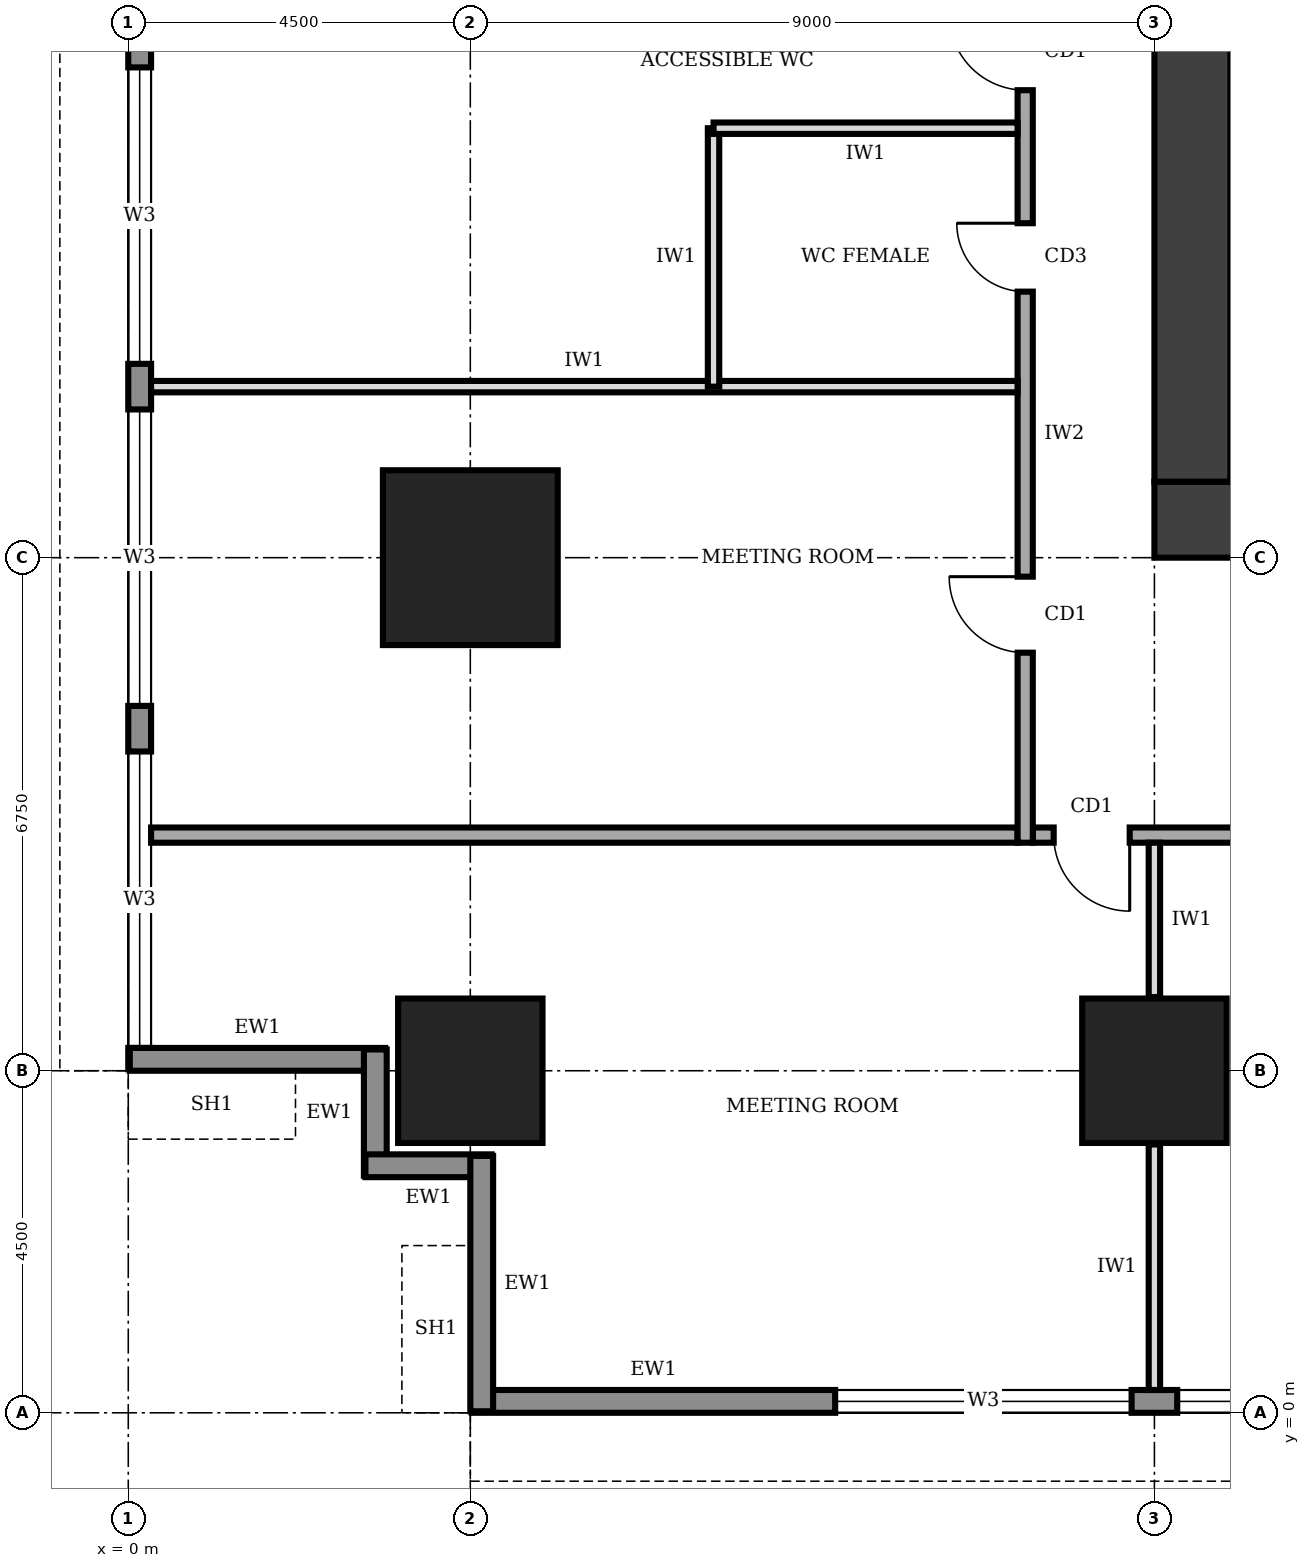
"""IFC4 building model, lengths in metres.
Left out: names, types, materials, properties, quantities, classifications, styles, units other than length and angle.
Written with IfcOpenShell. Run it as: python <this file> out.ifc"""

import sys

from ifc_helpers import new_model, si_unit, direction, frame, frame_2d, origin, origin_2d, place, context, subcontext, project, spatial, rectangle, extrude, element, fill, save


model = new_model("IFC4")
c1 = context("Model", 3, precision=1e-05, world=origin(), true_north=direction((0.0, 1.0)))
c2 = subcontext(c1, "Body", "Model", "MODEL_VIEW")
j1 = project(units=[si_unit("LENGTHUNIT", "METRE"), si_unit("PLANEANGLEUNIT", "RADIAN")], contexts=[c1])
p1 = place(None, origin())
s1 = spatial("IfcSite", under=j1, at=p1, CompositionType="ELEMENT")
p2 = place(p1, origin())
s2 = spatial("IfcBuilding", under=s1, at=p2, CompositionType="ELEMENT")
p3 = place(p2, frame((0.0, 0.0, 85.0)))
s3 = spatial("IfcBuildingStorey", under=s2, at=p3, CompositionType="ELEMENT", Elevation=85.0)
p4 = place(p3, frame((13.5, 11.75, 0.0), z_axis=(0.0, 0.0, 1.0), x_axis=(1.0, 0.0, 0.0)))
e1 = element("IfcWall", 1, at=p4, inside=s3, PredefinedType="SHEAR", context=c2, shape_type="SweptSolid", body=[
    extrude(rectangle(XDim=13.5, YDim=1.0, at=frame_2d((6.75, 0.0))), origin(), (0.0, 0.0, 1.0), 4.0),
])
p5 = place(p4, frame((4.75, 0.0, 0.0)))
e2 = element("IfcOpeningElement", 2, at=p5, cuts=e1, PredefinedType="OPENING", context=c2, shape_type="SweptSolid", body=[
    extrude(rectangle(XDim=1.0, YDim=2.1, at=frame_2d((0.5, 1.05))), frame((0.0, 0.51, 0.0), z_axis=(0.0, -1.0, 0.0), x_axis=(1.0, 0.0, 0.0)), (0.0, 0.0, 1.0), 1.02),
])
p6 = place(p3, frame((14.0, 28.25, 0.0), z_axis=(0.0, 0.0, 1.0), x_axis=(0.0, -1.0, 0.0)))
e3 = element("IfcWall", 3, at=p6, inside=s3, PredefinedType="SHEAR", context=c2, shape_type="SweptSolid", body=[
    extrude(rectangle(XDim=16.0, YDim=1.0, at=frame_2d((8.0, 0.0))), origin(), (0.0, 0.0, 1.0), 4.0),
])
for number, where, z_axis, x_axis in (
    (4, (4.5, 4.5, 0.0), (0.0, 0.0, 1.0), (1.0, 0.0, 0.0)),
    (5, (13.5, 4.5, 0.0), (0.0, 0.0, 1.0), (1.0, 0.0, 0.0)),
):
    element("IfcColumn", number, at=place(p3, frame(where, z_axis=z_axis, x_axis=x_axis)), inside=s3, PredefinedType="COLUMN", context=c2, shape_type="SweptSolid", body=[
        extrude(rectangle(XDim=1.9, YDim=1.9, at=origin_2d()), origin(), (0.0, 0.0, 1.0), 4.0),
    ])
p7 = place(p3, frame((4.5, 11.25, 0.0), z_axis=(0.0, 0.0, 1.0), x_axis=(1.0, 0.0, 0.0)))
e6 = element("IfcColumn", 6, at=p7, inside=s3, PredefinedType="COLUMN", context=c2, shape_type="SweptSolid", body=[
    extrude(rectangle(XDim=2.3, YDim=2.3, at=origin_2d()), origin(), (0.0, 0.0, 1.0), 4.0),
])
p8 = place(p3, frame((4.52, 0.15, 0.0), z_axis=(0.0, 0.0, 1.0), x_axis=(1.0, 0.0, 0.0)))
e7 = element("IfcWall", 7, at=p8, inside=s3, PredefinedType="STANDARD", context=c2, shape_type="SweptSolid", body=[
    extrude(rectangle(XDim=31.46, YDim=0.3, at=frame_2d((15.73, 0.0))), origin(), (0.0, 0.0, 1.0), 3.75),
])
p9 = place(p8, frame((4.78, 0.0, 0.95)))
e8 = element("IfcOpeningElement", 8, at=p9, cuts=e7, PredefinedType="OPENING", context=c2, shape_type="SweptSolid", body=[
    extrude(rectangle(XDim=3.9, YDim=1.8, at=frame_2d((1.95, 0.9))), frame((0.0, 0.16, 0.0), z_axis=(0.0, -1.0, 0.0), x_axis=(1.0, 0.0, 0.0)), (0.0, 0.0, 1.0), 0.32),
])
p10 = place(p8, frame((9.28, 0.0, 0.95)))
e9 = element("IfcOpeningElement", 9, at=p10, cuts=e7, PredefinedType="OPENING", context=c2, shape_type="SweptSolid", body=[
    extrude(rectangle(XDim=3.9, YDim=1.8, at=frame_2d((1.95, 0.9))), frame((0.0, 0.16, 0.0), z_axis=(0.0, -1.0, 0.0), x_axis=(1.0, 0.0, 0.0)), (0.0, 0.0, 1.0), 0.32),
])
p11 = place(p8, frame((13.78, 0.0, 0.95)))
e10 = element("IfcOpeningElement", 10, at=p11, cuts=e7, PredefinedType="OPENING", context=c2, shape_type="SweptSolid", body=[
    extrude(rectangle(XDim=3.9, YDim=1.8, at=frame_2d((1.95, 0.9))), frame((0.0, 0.16, 0.0), z_axis=(0.0, -1.0, 0.0), x_axis=(1.0, 0.0, 0.0)), (0.0, 0.0, 1.0), 0.32),
])
p12 = place(p8, frame((18.28, 0.0, 0.95)))
e11 = element("IfcOpeningElement", 11, at=p12, cuts=e7, PredefinedType="OPENING", context=c2, shape_type="SweptSolid", body=[
    extrude(rectangle(XDim=3.9, YDim=1.8, at=frame_2d((1.95, 0.9))), frame((0.0, 0.16, 0.0), z_axis=(0.0, -1.0, 0.0), x_axis=(1.0, 0.0, 0.0)), (0.0, 0.0, 1.0), 0.32),
])
p13 = place(p8, frame((22.78, 0.0, 0.95)))
e12 = element("IfcOpeningElement", 12, at=p13, cuts=e7, PredefinedType="OPENING", context=c2, shape_type="SweptSolid", body=[
    extrude(rectangle(XDim=3.9, YDim=1.8, at=frame_2d((1.95, 0.9))), frame((0.0, 0.16, 0.0), z_axis=(0.0, -1.0, 0.0), x_axis=(1.0, 0.0, 0.0)), (0.0, 0.0, 1.0), 0.32),
])
p14 = place(p8, frame((27.28, 0.0, 0.95)))
e13 = element("IfcOpeningElement", 13, at=p14, cuts=e7, PredefinedType="OPENING", context=c2, shape_type="SweptSolid", body=[
    extrude(rectangle(XDim=3.9, YDim=1.8, at=frame_2d((1.95, 0.9))), frame((0.0, 0.16, 0.0), z_axis=(0.0, -1.0, 0.0), x_axis=(1.0, 0.0, 0.0)), (0.0, 0.0, 1.0), 0.32),
])
p15 = place(p3, frame((0.15, 35.98, 0.0), z_axis=(0.0, 0.0, 1.0), x_axis=(0.0, -1.0, 0.0)))
e14 = element("IfcWall", 14, at=p15, inside=s3, PredefinedType="STANDARD", context=c2, shape_type="SweptSolid", body=[
    extrude(rectangle(XDim=31.46, YDim=0.3, at=frame_2d((15.73, 0.0))), origin(), (0.0, 0.0, 1.0), 3.75),
])
p16 = place(p15, frame((27.28, 0.0, 0.95)))
e15 = element("IfcOpeningElement", 15, at=p16, cuts=e14, PredefinedType="OPENING", context=c2, shape_type="SweptSolid", body=[
    extrude(rectangle(XDim=3.9, YDim=1.8, at=frame_2d((1.95, 0.9))), frame((0.0, 0.16, 0.0), z_axis=(0.0, -1.0, 0.0), x_axis=(1.0, 0.0, 0.0)), (0.0, 0.0, 1.0), 0.32),
])
p17 = place(p15, frame((22.78, 0.0, 0.95)))
e16 = element("IfcOpeningElement", 16, at=p17, cuts=e14, PredefinedType="OPENING", context=c2, shape_type="SweptSolid", body=[
    extrude(rectangle(XDim=3.9, YDim=1.8, at=frame_2d((1.95, 0.9))), frame((0.0, 0.16, 0.0), z_axis=(0.0, -1.0, 0.0), x_axis=(1.0, 0.0, 0.0)), (0.0, 0.0, 1.0), 0.32),
])
p18 = place(p15, frame((18.28, 0.0, 0.95)))
e17 = element("IfcOpeningElement", 17, at=p18, cuts=e14, PredefinedType="OPENING", context=c2, shape_type="SweptSolid", body=[
    extrude(rectangle(XDim=3.9, YDim=1.8, at=frame_2d((1.95, 0.9))), frame((0.0, 0.16, 0.0), z_axis=(0.0, -1.0, 0.0), x_axis=(1.0, 0.0, 0.0)), (0.0, 0.0, 1.0), 0.32),
])
p19 = place(p15, frame((13.78, 0.0, 0.95)))
e18 = element("IfcOpeningElement", 18, at=p19, cuts=e14, PredefinedType="OPENING", context=c2, shape_type="SweptSolid", body=[
    extrude(rectangle(XDim=3.9, YDim=1.8, at=frame_2d((1.95, 0.9))), frame((0.0, 0.16, 0.0), z_axis=(0.0, -1.0, 0.0), x_axis=(1.0, 0.0, 0.0)), (0.0, 0.0, 1.0), 0.32),
])
p20 = place(p15, frame((9.28, 0.0, 0.95)))
e19 = element("IfcOpeningElement", 19, at=p20, cuts=e14, PredefinedType="OPENING", context=c2, shape_type="SweptSolid", body=[
    extrude(rectangle(XDim=3.9, YDim=1.8, at=frame_2d((1.95, 0.9))), frame((0.0, 0.16, 0.0), z_axis=(0.0, -1.0, 0.0), x_axis=(1.0, 0.0, 0.0)), (0.0, 0.0, 1.0), 0.32),
])
p21 = place(p15, frame((4.78, 0.0, 0.95)))
e20 = element("IfcOpeningElement", 20, at=p21, cuts=e14, PredefinedType="OPENING", context=c2, shape_type="SweptSolid", body=[
    extrude(rectangle(XDim=3.9, YDim=1.8, at=frame_2d((1.95, 0.9))), frame((0.0, 0.16, 0.0), z_axis=(0.0, -1.0, 0.0), x_axis=(1.0, 0.0, 0.0)), (0.0, 0.0, 1.0), 0.32),
])
p22 = place(p3, frame((0.02, 4.65, 0.0), z_axis=(0.0, 0.0, 1.0), x_axis=(1.0, 0.0, 0.0)))
e21 = element("IfcWall", 21, at=p22, inside=s3, PredefinedType="STANDARD", context=c2, shape_type="SweptSolid", body=[
    extrude(rectangle(XDim=3.36, YDim=0.3, at=frame_2d((1.68, 0.0))), origin(), (0.0, 0.0, 1.0), 2.85),
])
for number, where, z_axis, x_axis in (
    (22, (3.25, 4.78, 0.0), (0.0, 0.0, 1.0), (0.0, -1.0, 0.0)),
    (23, (3.12, 3.25, 0.0), (0.0, 0.0, 1.0), (1.0, 0.0, 0.0)),
):
    element("IfcWall", number, at=place(p3, frame(where, z_axis=z_axis, x_axis=x_axis)), inside=s3, PredefinedType="STANDARD", context=c2, shape_type="SweptSolid", body=[
        extrude(rectangle(XDim=1.66, YDim=0.3, at=frame_2d((0.83, 0.0))), origin(), (0.0, 0.0, 1.0), 3.75),
    ])
p23 = place(p3, frame((4.65, 3.38, 0.0), z_axis=(0.0, 0.0, 1.0), x_axis=(0.0, -1.0, 0.0)))
e24 = element("IfcWall", 24, at=p23, inside=s3, PredefinedType="STANDARD", context=c2, shape_type="SweptSolid", body=[
    extrude(rectangle(XDim=3.36, YDim=0.3, at=frame_2d((1.68, 0.0))), origin(), (0.0, 0.0, 1.0), 2.85),
])
p24 = place(p3, frame((11.9, 7.6, 0.0), z_axis=(0.0, 0.0, 1.0), x_axis=(1.0, 0.0, 0.0)))
e25 = element("IfcWall", 25, at=p24, inside=s3, PredefinedType="SOLIDWALL", context=c2, shape_type="SweptSolid", body=[
    extrude(rectangle(XDim=28.3, YDim=0.2, at=frame_2d((14.15, 0.0))), origin(), (0.0, 0.0, 1.0), 3.75),
])
p25 = place(p24, frame((0.275, 0.0, 0.0)))
e26 = element("IfcOpeningElement", 26, at=p25, cuts=e25, PredefinedType="OPENING", context=c2, shape_type="SweptSolid", body=[
    extrude(rectangle(XDim=1.0, YDim=2.1, at=frame_2d((0.5, 1.05))), frame((0.0, 0.11, 0.0), z_axis=(0.0, -1.0, 0.0), x_axis=(1.0, 0.0, 0.0)), (0.0, 0.0, 1.0), 0.22),
])
p26 = place(p24, frame((7.45, 0.0, 0.0)))
e27 = element("IfcOpeningElement", 27, at=p26, cuts=e25, PredefinedType="OPENING", context=c2, shape_type="SweptSolid", body=[
    extrude(rectangle(XDim=1.8, YDim=2.1, at=frame_2d((0.9, 1.05))), frame((0.0, 0.11, 0.0), z_axis=(0.0, -1.0, 0.0), x_axis=(1.0, 0.0, 0.0)), (0.0, 0.0, 1.0), 0.22),
])
p27 = place(p24, frame((21.3, 0.0, 0.0)))
e28 = element("IfcOpeningElement", 28, at=p27, cuts=e25, PredefinedType="OPENING", context=c2, shape_type="SweptSolid", body=[
    extrude(rectangle(XDim=1.0, YDim=2.1, at=frame_2d((0.5, 1.05))), frame((0.0, 0.11, 0.0), z_axis=(0.0, -1.0, 0.0), x_axis=(1.0, 0.0, 0.0)), (0.0, 0.0, 1.0), 0.22),
])
p28 = place(p3, frame((11.8, 32.8, 0.0), z_axis=(0.0, 0.0, 1.0), x_axis=(0.0, -1.0, 0.0)))
e29 = element("IfcWall", 29, at=p28, inside=s3, PredefinedType="SOLIDWALL", context=c2, shape_type="SweptSolid", body=[
    extrude(rectangle(XDim=25.3, YDim=0.2, at=frame_2d((12.65, 0.0))), origin(), (0.0, 0.0, 1.0), 3.75),
])
p29 = place(p28, frame((21.8, 0.0, 0.0)))
e30 = element("IfcOpeningElement", 30, at=p29, cuts=e29, PredefinedType="OPENING", context=c2, shape_type="SweptSolid", body=[
    extrude(rectangle(XDim=1.0, YDim=2.1, at=frame_2d((0.5, 1.05))), frame((0.0, 0.11, 0.0), z_axis=(0.0, -1.0, 0.0), x_axis=(1.0, 0.0, 0.0)), (0.0, 0.0, 1.0), 0.22),
])
p30 = place(p28, frame((17.15, 0.0, 0.0)))
e31 = element("IfcOpeningElement", 31, at=p30, cuts=e29, PredefinedType="OPENING", context=c2, shape_type="SweptSolid", body=[
    extrude(rectangle(XDim=0.9, YDim=2.1, at=frame_2d((0.45, 1.05))), frame((0.0, 0.11, 0.0), z_axis=(0.0, -1.0, 0.0), x_axis=(1.0, 0.0, 0.0)), (0.0, 0.0, 1.0), 0.22),
])
p31 = place(p28, frame((12.35, 0.0, 0.0)))
e32 = element("IfcOpeningElement", 32, at=p31, cuts=e29, PredefinedType="OPENING", context=c2, shape_type="SweptSolid", body=[
    extrude(rectangle(XDim=0.9, YDim=2.1, at=frame_2d((0.45, 1.05))), frame((0.0, 0.11, 0.0), z_axis=(0.0, -1.0, 0.0), x_axis=(1.0, 0.0, 0.0)), (0.0, 0.0, 1.0), 0.22),
])
p32 = place(p28, frame((9.3, 0.0, 0.0)))
e33 = element("IfcOpeningElement", 33, at=p32, cuts=e29, PredefinedType="OPENING", context=c2, shape_type="SweptSolid", body=[
    extrude(rectangle(XDim=0.9, YDim=2.1, at=frame_2d((0.45, 1.05))), frame((0.0, 0.11, 0.0), z_axis=(0.0, -1.0, 0.0), x_axis=(1.0, 0.0, 0.0)), (0.0, 0.0, 1.0), 0.22),
])
p33 = place(p28, frame((6.3, 0.0, 0.0)))
e34 = element("IfcOpeningElement", 34, at=p33, cuts=e29, PredefinedType="OPENING", context=c2, shape_type="SweptSolid", body=[
    extrude(rectangle(XDim=1.0, YDim=2.1, at=frame_2d((0.5, 1.05))), frame((0.0, 0.11, 0.0), z_axis=(0.0, -1.0, 0.0), x_axis=(1.0, 0.0, 0.0)), (0.0, 0.0, 1.0), 0.22),
])
p34 = place(p28, frame((14.4, 0.0, 0.0)))
e35 = element("IfcOpeningElement", 35, at=p34, cuts=e29, PredefinedType="OPENING", context=c2, shape_type="SweptSolid", body=[
    extrude(rectangle(XDim=1.0, YDim=2.1, at=frame_2d((0.5, 1.05))), frame((0.0, 0.11, 0.0), z_axis=(0.0, -1.0, 0.0), x_axis=(1.0, 0.0, 0.0)), (0.0, 0.0, 1.0), 0.22),
])
p35 = place(p28, frame((2.3, 0.0, 0.0)))
e36 = element("IfcOpeningElement", 36, at=p35, cuts=e29, PredefinedType="OPENING", context=c2, shape_type="SweptSolid", body=[
    extrude(rectangle(XDim=1.0, YDim=2.1, at=frame_2d((0.5, 1.05))), frame((0.0, 0.11, 0.0), z_axis=(0.0, -1.0, 0.0), x_axis=(1.0, 0.0, 0.0)), (0.0, 0.0, 1.0), 0.22),
])
p36 = place(p3, frame((0.3, 7.6, 0.0), z_axis=(0.0, 0.0, 1.0), x_axis=(1.0, 0.0, 0.0)))
e37 = element("IfcWall", 37, at=p36, inside=s3, PredefinedType="SOLIDWALL", context=c2, shape_type="SweptSolid", body=[
    extrude(rectangle(XDim=11.4, YDim=0.2, at=frame_2d((5.7, 0.0))), origin(), (0.0, 0.0, 1.0), 3.75),
])
p37 = place(p3, frame((13.5, 0.3, 0.0), z_axis=(0.0, 0.0, 1.0), x_axis=(0.0, 1.0, 0.0)))
e38 = element("IfcWall", 38, at=p37, inside=s3, PredefinedType="PARTITIONING", context=c2, shape_type="SweptSolid", body=[
    extrude(rectangle(XDim=3.23, YDim=0.15, at=frame_2d((1.615, 0.0))), origin(), (0.0, 0.0, 1.0), 2.85),
])
p38 = place(p3, frame((13.5, 5.47, 0.0), z_axis=(0.0, 0.0, 1.0), x_axis=(0.0, 1.0, 0.0)))
e39 = element("IfcWall", 39, at=p38, inside=s3, PredefinedType="PARTITIONING", context=c2, shape_type="SweptSolid", body=[
    extrude(rectangle(XDim=2.03, YDim=0.15, at=frame_2d((1.015, 0.0))), origin(), (0.0, 0.0, 1.0), 2.85),
])
p39 = place(p3, frame((0.3, 13.5, 0.0), z_axis=(0.0, 0.0, 1.0), x_axis=(1.0, 0.0, 0.0)))
e40 = element("IfcWall", 40, at=p39, inside=s3, PredefinedType="PARTITIONING", context=c2, shape_type="SweptSolid", body=[
    extrude(rectangle(XDim=11.4, YDim=0.15, at=frame_2d((5.7, 0.0))), origin(), (0.0, 0.0, 1.0), 3.75),
])
p40 = place(p3, frame((11.7, 16.9, 0.0), z_axis=(0.0, 0.0, 1.0), x_axis=(-1.0, 0.0, 0.0)))
e41 = element("IfcWall", 41, at=p40, inside=s3, PredefinedType="PARTITIONING", context=c2, shape_type="SweptSolid", body=[
    extrude(rectangle(XDim=4.0, YDim=0.15, at=frame_2d((2.0, 0.0))), origin(), (0.0, 0.0, 1.0), 3.75),
])
p41 = place(p3, frame((7.7, 13.5, 0.0), z_axis=(0.0, 0.0, 1.0), x_axis=(0.0, 1.0, 0.0)))
e42 = element("IfcWall", 42, at=p41, inside=s3, PredefinedType="PARTITIONING", context=c2, shape_type="SweptSolid", body=[
    extrude(rectangle(XDim=3.4, YDim=0.15, at=frame_2d((1.7, 0.0))), origin(), (0.0, 0.0, 1.0), 3.75),
])
p42 = place(p9, origin())
e43 = element("IfcWindow", 43, at=p42, inside=s3, PartitioningType="SINGLE_PANEL", PredefinedType="WINDOW", context=c2, shape_type="SweptSolid", body=[
    extrude(rectangle(XDim=3.9, YDim=1.8, at=frame_2d((1.95, 0.9))), frame((0.0, 0.03, 0.0), z_axis=(0.0, -1.0, 0.0), x_axis=(1.0, 0.0, 0.0)), (0.0, 0.0, 1.0), 0.06),
])
fill(e8, e43)
p43 = place(p10, origin())
e44 = element("IfcWindow", 44, at=p43, inside=s3, PartitioningType="SINGLE_PANEL", PredefinedType="WINDOW", context=c2, shape_type="SweptSolid", body=[
    extrude(rectangle(XDim=3.9, YDim=1.8, at=frame_2d((1.95, 0.9))), frame((0.0, 0.03, 0.0), z_axis=(0.0, -1.0, 0.0), x_axis=(1.0, 0.0, 0.0)), (0.0, 0.0, 1.0), 0.06),
])
fill(e9, e44)
p44 = place(p16, origin())
e45 = element("IfcWindow", 45, at=p44, inside=s3, PartitioningType="SINGLE_PANEL", PredefinedType="WINDOW", context=c2, shape_type="SweptSolid", body=[
    extrude(rectangle(XDim=3.9, YDim=1.8, at=frame_2d((1.95, 0.9))), frame((0.0, 0.03, 0.0), z_axis=(0.0, -1.0, 0.0), x_axis=(1.0, 0.0, 0.0)), (0.0, 0.0, 1.0), 0.06),
])
fill(e15, e45)
p45 = place(p17, origin())
e46 = element("IfcWindow", 46, at=p45, inside=s3, PartitioningType="SINGLE_PANEL", PredefinedType="WINDOW", context=c2, shape_type="SweptSolid", body=[
    extrude(rectangle(XDim=3.9, YDim=1.8, at=frame_2d((1.95, 0.9))), frame((0.0, 0.03, 0.0), z_axis=(0.0, -1.0, 0.0), x_axis=(1.0, 0.0, 0.0)), (0.0, 0.0, 1.0), 0.06),
])
fill(e16, e46)
p46 = place(p18, origin())
e47 = element("IfcWindow", 47, at=p46, inside=s3, PartitioningType="SINGLE_PANEL", PredefinedType="WINDOW", context=c2, shape_type="SweptSolid", body=[
    extrude(rectangle(XDim=3.9, YDim=1.8, at=frame_2d((1.95, 0.9))), frame((0.0, 0.03, 0.0), z_axis=(0.0, -1.0, 0.0), x_axis=(1.0, 0.0, 0.0)), (0.0, 0.0, 1.0), 0.06),
])
fill(e17, e47)
p47 = place(p25, frame((1.0, 0.0, 0.0), z_axis=(0.0, 0.0, 1.0), x_axis=(-1.0, 0.0, 0.0)))
e48 = element("IfcDoor", 48, at=p47, inside=s3, OperationType="SINGLE_SWING_LEFT", PredefinedType="DOOR", context=c2, shape_type="SweptSolid", body=[
    extrude(rectangle(XDim=1.0, YDim=2.1, at=frame_2d((0.5, 1.05))), frame((0.0, 0.025, 0.0), z_axis=(0.0, -1.0, 0.0), x_axis=(1.0, 0.0, 0.0)), (0.0, 0.0, 1.0), 0.05),
])
fill(e26, e48)
p48 = place(p29, frame((1.0, 0.0, 0.0), z_axis=(0.0, 0.0, 1.0), x_axis=(-1.0, 0.0, 0.0)))
e49 = element("IfcDoor", 49, at=p48, inside=s3, OperationType="SINGLE_SWING_RIGHT", PredefinedType="DOOR", context=c2, shape_type="SweptSolid", body=[
    extrude(rectangle(XDim=1.0, YDim=2.1, at=frame_2d((0.5, 1.05))), frame((0.0, 0.025, 0.0), z_axis=(0.0, -1.0, 0.0), x_axis=(1.0, 0.0, 0.0)), (0.0, 0.0, 1.0), 0.05),
])
fill(e30, e49)
p49 = place(p30, frame((0.9, 0.0, 0.0), z_axis=(0.0, 0.0, 1.0), x_axis=(-1.0, 0.0, 0.0)))
e50 = element("IfcDoor", 50, at=p49, inside=s3, OperationType="SINGLE_SWING_RIGHT", PredefinedType="DOOR", context=c2, shape_type="SweptSolid", body=[
    extrude(rectangle(XDim=0.9, YDim=2.1, at=frame_2d((0.45, 1.05))), frame((0.0, 0.025, 0.0), z_axis=(0.0, -1.0, 0.0), x_axis=(1.0, 0.0, 0.0)), (0.0, 0.0, 1.0), 0.05),
])
fill(e31, e50)
p50 = place(p34, frame((1.0, 0.0, 0.0), z_axis=(0.0, 0.0, 1.0), x_axis=(-1.0, 0.0, 0.0)))
e51 = element("IfcDoor", 51, at=p50, inside=s3, OperationType="SINGLE_SWING_RIGHT", PredefinedType="DOOR", context=c2, shape_type="SweptSolid", body=[
    extrude(rectangle(XDim=1.0, YDim=2.1, at=frame_2d((0.5, 1.05))), frame((0.0, 0.025, 0.0), z_axis=(0.0, -1.0, 0.0), x_axis=(1.0, 0.0, 0.0)), (0.0, 0.0, 1.0), 0.05),
])
fill(e35, e51)
save(model, sys.argv[1])
